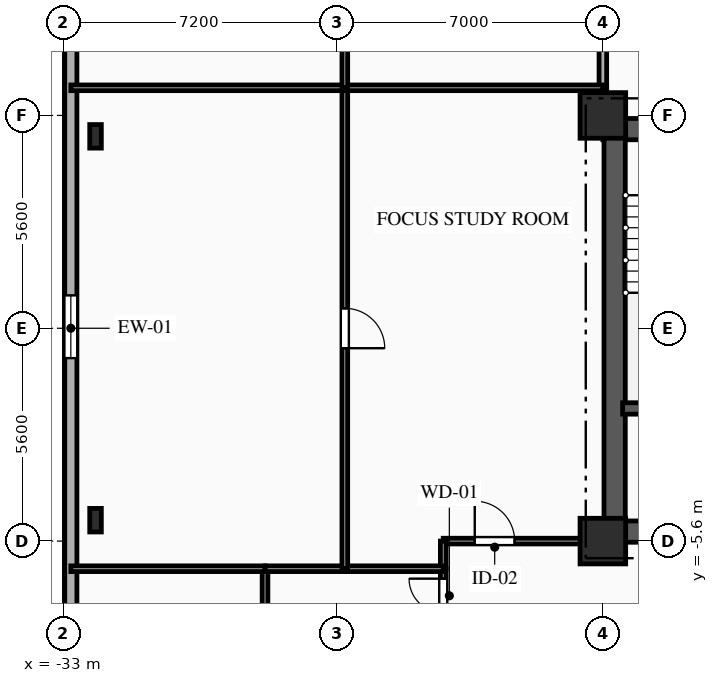
"""IFC4 building model, lengths in metres.
Left out: names, types, materials, properties, quantities, classifications, styles, units other than length and angle.
Written with IfcOpenShell. Run it as: python <this file> out.ifc"""

import sys

from ifc_helpers import new_model, si_unit, direction, frame, frame_2d, origin, origin_2d, place, context, subcontext, project, spatial, rectangle, i_section, extrude, element, fill, save


model = new_model("IFC4")
c1 = context("Model", 3, precision=1e-05, world=origin(), true_north=direction((0.0, 1.0)))
c2 = subcontext(c1, "Body", "Model", "MODEL_VIEW")
j1 = project(units=[si_unit("LENGTHUNIT", "METRE"), si_unit("PLANEANGLEUNIT", "RADIAN")], contexts=[c1])
p1 = place(None, origin())
s1 = spatial("IfcSite", under=j1, at=p1, CompositionType="ELEMENT")
p2 = place(p1, origin())
s2 = spatial("IfcBuilding", under=s1, at=p2, CompositionType="ELEMENT")
p3 = place(p2, frame((0.0, 0.0, 63.85)))
s3 = spatial("IfcBuildingStorey", under=s2, at=p3, CompositionType="ELEMENT", Elevation=63.85)
for number, where, z_axis, x_axis in (
    (1, (-18.8, -5.6, 0.0), (0.0, 0.0, 1.0), (1.0, 0.0, 0.0)),
    (2, (-18.8, 5.6, 0.0), (0.0, 0.0, 1.0), (1.0, 0.0, 0.0)),
):
    element("IfcColumn", number, at=place(p3, frame(where, z_axis=z_axis, x_axis=x_axis)), inside=s3, PredefinedType="COLUMN", context=c2, shape_type="SweptSolid", body=[
        extrude(rectangle(XDim=1.2, YDim=1.2, at=origin_2d()), origin(), (0.0, 0.0, 1.0), 3.35),
    ])
for number, where, z_axis, x_axis in (
    (3, (-32.15, 5.05, 0.0), (0.0, 0.0, 1.0), (1.0, 0.0, 0.0)),
    (4, (-32.15, -5.05, 0.0), (0.0, 0.0, 1.0), (1.0, 0.0, 0.0)),
):
    element("IfcColumn", number, at=place(p3, frame(where, z_axis=z_axis, x_axis=x_axis)), inside=s3, PredefinedType="COLUMN", context=c2, shape_type="SweptSolid", body=[
        extrude(i_section(OverallWidth=0.305, OverallDepth=0.62, WebThickness=0.021, FlangeThickness=0.04, FilletRadius=0.027, at=origin_2d()), origin(), (0.0, 0.0, 1.0), 3.35),
    ])
p4 = place(p3, frame((-32.8, -15.8, 0.0), z_axis=(0.0, 0.0, 1.0), x_axis=(0.0, 1.0, 0.0)))
e5 = element("IfcWall", 5, at=p4, inside=s3, PredefinedType="SOLIDWALL", context=c2, shape_type="SweptSolid", body=[
    extrude(rectangle(XDim=31.6, YDim=0.32, at=frame_2d((15.8, 0.0))), origin(), (0.0, 0.0, 1.0), 3.035),
])
p5 = place(p4, frame((4.175, 0.0, 0.85)))
e6 = element("IfcOpeningElement", 6, at=p5, cuts=e5, PredefinedType="OPENING", context=c2, shape_type="SweptSolid", body=[
    extrude(rectangle(XDim=1.65, YDim=1.85, at=frame_2d((0.825, 0.925))), frame((0.0, 0.17, 0.0), z_axis=(0.0, -1.0, 0.0), x_axis=(1.0, 0.0, 0.0)), (0.0, 0.0, 1.0), 0.34),
])
p6 = place(p4, frame((15.015, 0.0, 0.85)))
e7 = element("IfcOpeningElement", 7, at=p6, cuts=e5, PredefinedType="OPENING", context=c2, shape_type="SweptSolid", body=[
    extrude(rectangle(XDim=1.65, YDim=1.85, at=frame_2d((0.825, 0.925))), frame((0.0, 0.17, 0.0), z_axis=(0.0, -1.0, 0.0), x_axis=(1.0, 0.0, 0.0)), (0.0, 0.0, 1.0), 0.34),
])
p7 = place(p4, frame((25.855, 0.0, 0.85)))
e8 = element("IfcOpeningElement", 8, at=p7, cuts=e5, PredefinedType="OPENING", context=c2, shape_type="SweptSolid", body=[
    extrude(rectangle(XDim=1.65, YDim=1.85, at=frame_2d((0.825, 0.925))), frame((0.0, 0.17, 0.0), z_axis=(0.0, -1.0, 0.0), x_axis=(1.0, 0.0, 0.0)), (0.0, 0.0, 1.0), 0.34),
])
p8 = place(p3, frame((-18.8, 5.24, 0.0), z_axis=(0.0, 0.0, 1.0), x_axis=(1.0, 0.0, 0.0)))
e9 = element("IfcWall", 9, at=p8, inside=s3, PredefinedType="SHEAR", context=c2, shape_type="SweptSolid", body=[
    extrude(rectangle(XDim=9.6, YDim=0.56, at=frame_2d((4.8, 0.0))), origin(), (0.0, 0.0, 1.0), 3.035),
])
p9 = place(p8, frame((1.55, 0.0, 0.0)))
e10 = element("IfcOpeningElement", 10, at=p9, cuts=e9, PredefinedType="OPENING", context=c2, shape_type="SweptSolid", body=[
    extrude(rectangle(XDim=1.1, YDim=2.15, at=frame_2d((0.55, 1.075))), frame((0.0, 0.29, 0.0), z_axis=(0.0, -1.0, 0.0), x_axis=(1.0, 0.0, 0.0)), (0.0, 0.0, 1.0), 0.58),
])
p10 = place(p8, frame((4.775, 0.0, 0.0)))
e11 = element("IfcOpeningElement", 11, at=p10, cuts=e9, PredefinedType="OPENING", context=c2, shape_type="SweptSolid", body=[
    extrude(rectangle(XDim=1.05, YDim=2.1, at=frame_2d((0.525, 1.05))), frame((0.0, 0.29, 0.0), z_axis=(0.0, -1.0, 0.0), x_axis=(1.0, 0.0, 0.0)), (0.0, 0.0, 1.0), 0.58),
])
p11 = place(p3, frame((-18.8, -5.35, 0.0), z_axis=(0.0, 0.0, 1.0), x_axis=(1.0, 0.0, 0.0)))
e12 = element("IfcWall", 12, at=p11, inside=s3, PredefinedType="SHEAR", context=c2, shape_type="SweptSolid", body=[
    extrude(rectangle(XDim=9.6, YDim=0.56, at=frame_2d((4.8, 0.0))), origin(), (0.0, 0.0, 1.0), 3.035),
])
p12 = place(p11, frame((1.05, 0.0, 0.0)))
e13 = element("IfcOpeningElement", 13, at=p12, cuts=e12, PredefinedType="OPENING", context=c2, shape_type="SweptSolid", body=[
    extrude(rectangle(XDim=0.9, YDim=2.1, at=frame_2d((0.45, 1.05))), frame((0.0, 0.29, 0.0), z_axis=(0.0, -1.0, 0.0), x_axis=(1.0, 0.0, 0.0)), (0.0, 0.0, 1.0), 0.58),
])
p13 = place(p3, frame((-18.49, -5.05, 0.0), z_axis=(0.0, 0.0, 1.0), x_axis=(0.0, 1.0, 0.0)))
e14 = element("IfcWall", 14, at=p13, inside=s3, PredefinedType="SHEAR", context=c2, shape_type="SweptSolid", body=[
    extrude(rectangle(XDim=10.1, YDim=0.56, at=frame_2d((5.05, 0.0))), origin(), (0.0, 0.0, 1.0), 3.035),
])
p14 = place(p3, frame((-18.28, -2.11, 0.0), z_axis=(0.0, 0.0, 1.0), x_axis=(1.0, 0.0, 0.0)))
e15 = element("IfcWall", 15, at=p14, inside=s3, PredefinedType="SHEAR", context=c2, shape_type="SweptSolid", body=[
    extrude(rectangle(XDim=3.18, YDim=0.3, at=frame_2d((1.59, 0.0))), origin(), (0.0, 0.0, 1.0), 3.035),
])
p15 = place(p3, frame((-18.8, 6.327, 0.0), z_axis=(0.0, 0.0, 1.0), x_axis=(0.0, -1.0, 0.0)))
e16 = element("IfcWall", 16, at=p15, inside=s3, PredefinedType="PARTITIONING", context=c2, shape_type="SweptSolid", body=[
    extrude(rectangle(XDim=0.727, YDim=0.2, at=frame_2d((0.363, 0.0))), origin(), (0.0, 0.0, 1.0), 2.52),
])
p16 = place(p3, frame((-18.8, 8.5, 0.0), z_axis=(0.0, 0.0, 1.0), x_axis=(0.0, -1.0, 0.0)))
e17 = element("IfcWall", 17, at=p16, inside=s3, PredefinedType="PARTITIONING", context=c2, shape_type="SweptSolid", body=[
    extrude(rectangle(XDim=2.173, YDim=0.2, at=frame_2d((1.086, 0.0))), origin(), (0.0, 0.0, 1.0), 2.52),
])
p17 = place(p3, frame((-23.0, -7.75, 0.0), z_axis=(0.0, 0.0, 1.0), x_axis=(0.0, 1.0, 0.0)))
e18 = element("IfcWall", 18, at=p17, inside=s3, PredefinedType="PARTITIONING", context=c2, shape_type="SweptSolid", body=[
    extrude(rectangle(XDim=1.423, YDim=0.15, at=frame_2d((0.711, 0.0))), origin(), (0.0, 0.0, 1.0), 3.035),
])
p18 = place(p17, frame((0.261, 0.0, 0.0)))
e19 = element("IfcOpeningElement", 19, at=p18, cuts=e18, PredefinedType="OPENING", context=c2, shape_type="SweptSolid", body=[
    extrude(rectangle(XDim=0.9, YDim=2.1, at=frame_2d((0.45, 1.05))), frame((0.0, 0.085, 0.0), z_axis=(0.0, -1.0, 0.0), x_axis=(1.0, 0.0, 0.0)), (0.0, 0.0, 1.0), 0.17),
])
p19 = place(p3, frame((-23.0, -5.6, 0.0), z_axis=(0.0, 0.0, 1.0), x_axis=(1.0, 0.0, 0.0)))
e20 = element("IfcWall", 20, at=p19, inside=s3, PredefinedType="PARTITIONING", context=c2, shape_type="SweptSolid", body=[
    extrude(rectangle(XDim=4.2, YDim=0.15, at=frame_2d((2.1, 0.0))), origin(), (0.0, 0.0, 1.0), 3.035),
])
p20 = place(p19, frame((0.829, 0.0, 0.0)))
e21 = element("IfcOpeningElement", 21, at=p20, cuts=e20, PredefinedType="OPENING", context=c2, shape_type="SweptSolid", body=[
    extrude(rectangle(XDim=1.05, YDim=2.15, at=frame_2d((0.525, 1.075))), frame((0.0, 0.085, 0.0), z_axis=(0.0, -1.0, 0.0), x_axis=(1.0, 0.0, 0.0)), (0.0, 0.0, 1.0), 0.17),
])
p21 = place(p3, frame((-23.0, -6.327, 0.0), z_axis=(0.0, 0.0, 1.0), x_axis=(0.0, 1.0, 0.0)))
e22 = element("IfcWall", 22, at=p21, inside=s3, PredefinedType="PARTITIONING", context=c2, shape_type="SweptSolid", body=[
    extrude(rectangle(XDim=0.727, YDim=0.15, at=frame_2d((0.363, 0.0))), origin(), (0.0, 0.0, 1.0), 3.035),
])
p22 = place(p3, frame((-27.69, -6.327, 0.0), z_axis=(0.0, 0.0, 1.0), x_axis=(0.0, -1.0, 0.0)))
e23 = element("IfcWall", 23, at=p22, inside=s3, PredefinedType="PARTITIONING", context=c2, shape_type="SweptSolid", body=[
    extrude(rectangle(XDim=13.073, YDim=0.15, at=frame_2d((6.537, 0.0))), origin(), (0.0, 0.0, 1.0), 3.035),
])
p23 = place(p22, frame((3.296, 0.0, 0.0)))
e24 = element("IfcOpeningElement", 24, at=p23, cuts=e23, PredefinedType="OPENING", context=c2, shape_type="SweptSolid", body=[
    extrude(rectangle(XDim=1.05, YDim=2.15, at=frame_2d((0.525, 1.075))), frame((0.0, 0.085, 0.0), z_axis=(0.0, -1.0, 0.0), x_axis=(1.0, 0.0, 0.0)), (0.0, 0.0, 1.0), 0.17),
])
p24 = place(p3, frame((-32.8, -6.327, 0.0), z_axis=(0.0, 0.0, 1.0), x_axis=(1.0, 0.0, 0.0)))
e25 = element("IfcWall", 25, at=p24, inside=s3, PredefinedType="PARTITIONING", context=c2, shape_type="SweptSolid", body=[
    extrude(rectangle(XDim=5.11, YDim=0.15, at=frame_2d((2.555, 0.0))), origin(), (0.0, 0.0, 1.0), 3.035),
])
p25 = place(p3, frame((-27.69, -6.327, 0.0), z_axis=(0.0, 0.0, 1.0), x_axis=(1.0, 0.0, 0.0)))
e26 = element("IfcWall", 26, at=p25, inside=s3, PredefinedType="PARTITIONING", context=c2, shape_type="SweptSolid", body=[
    extrude(rectangle(XDim=2.1, YDim=0.15, at=frame_2d((1.05, 0.0))), origin(), (0.0, 0.0, 1.0), 3.035),
])
p26 = place(p3, frame((-25.59, -6.327, 0.0), z_axis=(0.0, 0.0, 1.0), x_axis=(1.0, 0.0, 0.0)))
e27 = element("IfcWall", 27, at=p26, inside=s3, PredefinedType="PARTITIONING", context=c2, shape_type="SweptSolid", body=[
    extrude(rectangle(XDim=2.59, YDim=0.15, at=frame_2d((1.295, 0.0))), origin(), (0.0, 0.0, 1.0), 3.035),
])
p27 = place(p3, frame((-25.59, 6.327, 0.0), z_axis=(0.0, 0.0, 1.0), x_axis=(0.0, -1.0, 0.0)))
e28 = element("IfcWall", 28, at=p27, inside=s3, PredefinedType="PARTITIONING", context=c2, shape_type="SweptSolid", body=[
    extrude(rectangle(XDim=12.654, YDim=0.15, at=frame_2d((6.327, 0.0))), origin(), (0.0, 0.0, 1.0), 2.69),
])
p28 = place(p27, frame((5.802, 0.0, 0.0)))
e29 = element("IfcOpeningElement", 29, at=p28, cuts=e28, PredefinedType="OPENING", context=c2, shape_type="SweptSolid", body=[
    extrude(rectangle(XDim=1.05, YDim=2.15, at=frame_2d((0.525, 1.075))), frame((0.0, 0.085, 0.0), z_axis=(0.0, -1.0, 0.0), x_axis=(1.0, 0.0, 0.0)), (0.0, 0.0, 1.0), 0.17),
])
p29 = place(p3, frame((-32.8, 6.327, 0.0), z_axis=(0.0, 0.0, 1.0), x_axis=(1.0, 0.0, 0.0)))
e30 = element("IfcWall", 30, at=p29, inside=s3, PredefinedType="PARTITIONING", context=c2, shape_type="SweptSolid", body=[
    extrude(rectangle(XDim=7.21, YDim=0.15, at=frame_2d((3.605, 0.0))), origin(), (0.0, 0.0, 1.0), 3.035),
])
p30 = place(p3, frame((-25.59, 6.327, 0.0), z_axis=(0.0, 0.0, 1.0), x_axis=(1.0, 0.0, 0.0)))
e31 = element("IfcWall", 31, at=p30, inside=s3, PredefinedType="PARTITIONING", context=c2, shape_type="SweptSolid", body=[
    extrude(rectangle(XDim=6.79, YDim=0.15, at=frame_2d((3.395, 0.0))), origin(), (0.0, 0.0, 1.0), 3.035),
])
p31 = place(p3, frame((-25.59, 19.4, 0.0), z_axis=(0.0, 0.0, 1.0), x_axis=(0.0, -1.0, 0.0)))
e32 = element("IfcWall", 32, at=p31, inside=s3, PredefinedType="PARTITIONING", context=c2, shape_type="SweptSolid", body=[
    extrude(rectangle(XDim=13.073, YDim=0.15, at=frame_2d((6.537, 0.0))), origin(), (0.0, 0.0, 1.0), 2.69),
])
p32 = place(p31, frame((8.727, 0.0, 0.0)))
e33 = element("IfcOpeningElement", 33, at=p32, cuts=e32, PredefinedType="OPENING", context=c2, shape_type="SweptSolid", body=[
    extrude(rectangle(XDim=1.05, YDim=2.15, at=frame_2d((0.525, 1.075))), frame((0.0, 0.085, 0.0), z_axis=(0.0, -1.0, 0.0), x_axis=(1.0, 0.0, 0.0)), (0.0, 0.0, 1.0), 0.17),
])
p33 = place(p6, origin())
e34 = element("IfcWindow", 34, at=p33, inside=s3, PartitioningType="SINGLE_PANEL", PredefinedType="WINDOW", context=c2, shape_type="SweptSolid", body=[
    extrude(rectangle(XDim=1.65, YDim=1.85, at=frame_2d((0.825, 0.925))), frame((0.0, 0.03, 0.0), z_axis=(0.0, -1.0, 0.0), x_axis=(1.0, 0.0, 0.0)), (0.0, 0.0, 1.0), 0.06),
])
fill(e7, e34)
p34 = place(p18, origin())
e35 = element("IfcDoor", 35, at=p34, inside=s3, OperationType="SINGLE_SWING_RIGHT", PredefinedType="DOOR", context=c2, shape_type="SweptSolid", body=[
    extrude(rectangle(XDim=0.9, YDim=2.1, at=frame_2d((0.45, 1.05))), frame((0.0, 0.025, 0.0), z_axis=(0.0, -1.0, 0.0), x_axis=(1.0, 0.0, 0.0)), (0.0, 0.0, 1.0), 0.05),
])
fill(e19, e35)
p35 = place(p20, origin())
e36 = element("IfcDoor", 36, at=p35, inside=s3, OperationType="SINGLE_SWING_LEFT", PredefinedType="DOOR", context=c2, shape_type="SweptSolid", body=[
    extrude(rectangle(XDim=1.05, YDim=2.15, at=frame_2d((0.525, 1.075))), frame((0.0, 0.025, 0.0), z_axis=(0.0, -1.0, 0.0), x_axis=(1.0, 0.0, 0.0)), (0.0, 0.0, 1.0), 0.05),
])
fill(e21, e36)
p36 = place(p28, origin())
e37 = element("IfcDoor", 37, at=p36, inside=s3, OperationType="SINGLE_SWING_RIGHT", PredefinedType="DOOR", context=c2, shape_type="SweptSolid", body=[
    extrude(rectangle(XDim=1.05, YDim=2.15, at=frame_2d((0.525, 1.075))), frame((0.0, 0.025, 0.0), z_axis=(0.0, -1.0, 0.0), x_axis=(1.0, 0.0, 0.0)), (0.0, 0.0, 1.0), 0.05),
])
fill(e29, e37)
save(model, sys.argv[1])
